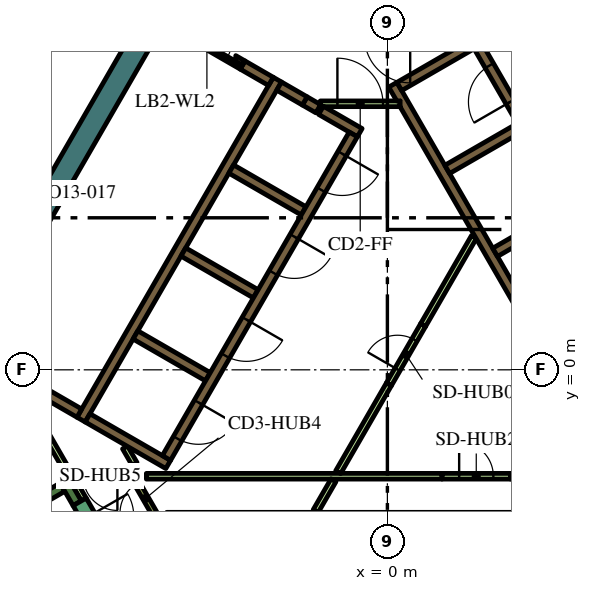
"""IFC4 building model, lengths in metres.
Left out: names, types, materials, properties, quantities, classifications, styles, units other than length and angle.
Written with IfcOpenShell. Run it as: python <this file> out.ifc"""

import sys

from ifc_helpers import new_model, si_unit, direction, frame, frame_2d, origin, place, context, subcontext, project, spatial, polyline, rectangle, outline, extrude, element, fill, save


model = new_model("IFC4")
c1 = context("Model", 3, precision=1e-05, world=origin(), true_north=direction((0.0, 1.0)))
c2 = subcontext(c1, "Body", "Model", "MODEL_VIEW")
j1 = project(units=[si_unit("LENGTHUNIT", "METRE"), si_unit("PLANEANGLEUNIT", "RADIAN")], contexts=[c1])
p1 = place(None, origin())
s1 = spatial("IfcSite", under=j1, at=p1, CompositionType="ELEMENT")
p2 = place(p1, origin())
s2 = spatial("IfcBuilding", under=s1, at=p2, CompositionType="ELEMENT")
p3 = place(p2, frame((0.0, 0.0, 292.2)))
s3 = spatial("IfcBuildingStorey", under=s2, at=p3, CompositionType="ELEMENT", Elevation=292.2)
p4 = place(p3, frame((1.989, 16.456, 0.0), z_axis=(0.0, 0.0, 1.0), x_axis=(0.49999102663, -0.8660305845, 0.0)))
e1 = element("IfcWall", 1, at=p4, inside=s3, PredefinedType="SOLIDWALL", context=c2, shape_type="SweptSolid", body=[
    extrude(rectangle(XDim=12.406, YDim=0.6, at=frame_2d((6.203, 0.0))), origin(), (0.0, 0.0, 1.0), 4.2),
])
p5 = place(p3, origin())
e2 = element("IfcWall", 2, at=p5, inside=s3, PredefinedType="SOLIDWALL", context=c2, shape_type="SweptSolid", body=[
    extrude(outline(polyline([(-15.502, -6.35), (-4.912, 11.992), (-4.393, 11.692), (-10.815, 0.569), (-10.84, 0.583), (-10.84, 0.583), (-10.84, 0.583), (-10.965, 0.367), (-10.965, 0.367), (-10.965, 0.367), (-10.94, 0.352), (-11.033, 0.191), (-14.809, -6.35), (-15.156, -6.95), (-15.502, -6.35)])), origin(), (0.0, 0.0, 1.0), 4.2),
])
p6 = place(p3, frame((-14.44, -6.49, 0.0), z_axis=(0.0, 0.0, 1.0), x_axis=(0.866022966069, 0.500004222222, 0.0)))
e3 = element("IfcWall", 3, at=p6, inside=s3, PredefinedType="SOLIDWALL", context=c2, shape_type="SweptSolid", body=[
    extrude(rectangle(XDim=6.8, YDim=0.25, at=frame_2d((3.4, 0.0))), origin(), (0.0, 0.0, 1.0), 4.2),
])
p7 = place(p3, frame((-8.163, -3.511, 0.0), z_axis=(0.0, 0.0, 1.0), x_axis=(-0.499994068514, 0.866028828302, 0.0)))
e4 = element("IfcWall", 4, at=p7, inside=s3, PredefinedType="SOLIDWALL", context=c2, shape_type="SweptSolid", body=[
    extrude(rectangle(XDim=0.674, YDim=0.25, at=frame_2d((0.337, 0.0))), origin(), (0.0, 0.0, 1.0), 4.2),
])
e5 = element("IfcWall", 5, at=p5, inside=s3, PredefinedType="SOLIDWALL", context=c2, shape_type="SweptSolid", body=[
    extrude(outline(polyline([(0.332, 6.925), (0.335, 6.925), (0.335, 6.925), (0.335, 6.925), (0.335, 7.075), (0.335, 7.075), (0.335, 7.075), (0.245, 7.075), (0.035, 7.439), (0.252, 7.564), (0.377, 7.348), (1.512, 5.382), (1.637, 5.165), (2.221, 4.153), (2.771, 3.199), (2.896, 2.983), (3.138, 2.564), (4.031, 1.017), (4.156, 0.801), (5.292, -1.165), (5.417, -1.382), (6.073, -2.519), (6.552, -3.348), (6.677, -3.564), (6.46, -3.689), (0.332, 6.925)])), origin(), (0.0, 0.0, 1.0), 4.2),
])
p8 = place(p3, frame((3.1, 9.064, 0.0), z_axis=(0.0, 0.0, 1.0), x_axis=(-0.866030133475, -0.499991807846, 0.0)))
e6 = element("IfcWall", 6, at=p8, inside=s3, PredefinedType="SOLIDWALL", context=c2, shape_type="SweptSolid", body=[
    extrude(rectangle(XDim=3.217, YDim=0.25, at=frame_2d((1.608, 0.0))), origin(), (0.0, 0.0, 1.0), 4.2),
])
p9 = place(p3, frame((1.574, 5.274, 0.0), z_axis=(0.0, 0.0, 1.0), x_axis=(0.866028486751, 0.499994660107, 0.0)))
e7 = element("IfcWall", 7, at=p9, inside=s3, PredefinedType="SOLIDWALL", context=c2, shape_type="SweptSolid", body=[
    extrude(rectangle(XDim=2.2, YDim=0.25, at=frame_2d((1.1, 0.0))), origin(), (0.0, 0.0, 1.0), 4.2),
])
p10 = place(p3, frame((2.834, 3.091, 0.0), z_axis=(0.0, 0.0, 1.0), x_axis=(0.866008176907, 0.50002983664, 0.0)))
e8 = element("IfcWall", 8, at=p10, inside=s3, PredefinedType="SOLIDWALL", context=c2, shape_type="SweptSolid", body=[
    extrude(rectangle(XDim=2.2, YDim=0.25, at=frame_2d((1.1, 0.0))), origin(), (0.0, 0.0, 1.0), 4.2),
])
p11 = place(p3, frame((-8.06, -1.311, 0.0), z_axis=(0.0, 0.0, 1.0), x_axis=(0.50000273126, 0.866023826885, 0.0)))
e9 = element("IfcWall", 9, at=p11, inside=s3, PredefinedType="SOLIDWALL", context=c2, shape_type="SweptSolid", body=[
    extrude(rectangle(XDim=10.33, YDim=0.25, at=frame_2d((5.165, 0.0))), origin(), (0.0, 0.0, 1.0), 4.2),
])
p12 = place(p3, frame((-1.819, 6.87, 0.0), z_axis=(0.0, 0.0, 1.0), x_axis=(-0.866294599386, 0.499533449405, 0.0)))
e10 = element("IfcWall", 10, at=p12, inside=s3, PredefinedType="SOLIDWALL", context=c2, shape_type="SweptSolid", body=[
    extrude(rectangle(XDim=0.41, YDim=0.25, at=frame_2d((0.205, 0.0))), origin(), (0.0, 0.0, 1.0), 4.2),
])
p13 = place(p3, frame((-2.849, 7.465, 0.0), z_axis=(0.0, 0.0, 1.0), x_axis=(0.865955664968, -0.500120771724, 0.0)))
e11 = element("IfcWall", 11, at=p13, inside=s3, PredefinedType="SOLIDWALL", context=c2, shape_type="SweptSolid", body=[
    extrude(rectangle(XDim=0.778, YDim=0.25, at=frame_2d((0.389, 0.0))), origin(), (0.0, 0.0, 1.0), 4.2),
])
p14 = place(p3, frame((-0.728, 6.24, 0.0), z_axis=(0.0, 0.0, 1.0), x_axis=(-0.866002680491, 0.500039355833, 0.0)))
e12 = element("IfcWall", 12, at=p14, inside=s3, PredefinedType="SOLIDWALL", context=c2, shape_type="SweptSolid", body=[
    extrude(rectangle(XDim=1.178, YDim=0.25, at=frame_2d((0.589, 0.0))), origin(), (0.0, 0.0, 1.0), 4.2),
])
for number, where, z_axis, x_axis in (
    (13, (-2.204, 4.182, 0.0), (0.0, 0.0, 1.0), (-0.866, 0.5, 0.0)),
    (14, (-5.369, 3.1, 0.0), (0.0, 0.0, 1.0), (0.866, -0.5, 0.0)),
    (15, (-4.724, -0.182, 0.0), (0.0, 0.0, 1.0), (-0.866, 0.5, 0.0)),
):
    element("IfcWall", number, at=place(p3, frame(where, z_axis=z_axis, x_axis=x_axis)), inside=s3, PredefinedType="SOLIDWALL", context=c2, shape_type="SweptSolid", body=[
        extrude(rectangle(XDim=2.2, YDim=0.25, at=frame_2d((1.1, 0.0))), origin(), (0.0, 0.0, 1.0), 4.2),
    ])
p15 = place(p3, frame((-7.889, -1.265, 0.0), z_axis=(0.0, 0.0, 1.0), x_axis=(0.866057815567, -0.499943856944, 0.0)))
e16 = element("IfcWall", 16, at=p15, inside=s3, PredefinedType="SOLIDWALL", context=c2, shape_type="SweptSolid", body=[
    extrude(rectangle(XDim=2.45, YDim=0.25, at=frame_2d((1.225, 0.0))), origin(), (0.0, 0.0, 1.0), 4.2),
])
p16 = place(p3, frame((-9.95, -0.075, 0.0), z_axis=(0.0, 0.0, 1.0), x_axis=(0.865962177421, -0.500109495288, 0.0)))
e17 = element("IfcWall", 17, at=p16, inside=s3, PredefinedType="SOLIDWALL", context=c2, shape_type="SweptSolid", body=[
    extrude(rectangle(XDim=2.129, YDim=0.25, at=frame_2d((1.065, 0.0))), origin(), (0.0, 0.0, 1.0), 4.2),
])
p17 = place(p3, frame((-3.809, 8.019, 0.0), z_axis=(0.0, 0.0, 1.0), x_axis=(0.866010229787, -0.500026281214, 0.0)))
e18 = element("IfcWall", 18, at=p17, inside=s3, PredefinedType="SOLIDWALL", context=c2, shape_type="SweptSolid", body=[
    extrude(rectangle(XDim=0.858, YDim=0.25, at=frame_2d((0.429, 0.0))), origin(), (0.0, 0.0, 1.0), 4.2),
])
e19 = element("IfcWall", 19, at=p5, inside=s3, PredefinedType="SOLIDWALL", context=c2, shape_type="SweptSolid", body=[
    extrude(outline(polyline([(-3.748, 8.128), (-3.813, 8.015), (-4.027, 8.139), (-4.017, 8.156), (-4.008, 8.173), (-4.0, 8.192), (-3.995, 8.21), (-3.991, 8.23), (-3.99, 8.25), (-3.99, 8.268), (-3.748, 8.128)])), origin(), (0.0, 0.0, 1.0), 4.2),
])
p18 = place(p3, frame((-9.718, -0.417, 0.0), z_axis=(0.0, 0.0, 1.0), x_axis=(0.499966538646, -0.866044721844, 0.0)))
e20 = element("IfcWall", 20, at=p18, inside=s3, PredefinedType="PARTITIONING", context=c2, shape_type="SweptSolid", body=[
    extrude(rectangle(XDim=2.511, YDim=0.15, at=frame_2d((1.255, 0.0))), origin(), (0.0, 0.0, 1.0), 3.55),
])
p19 = place(p3, frame((0.941, 1.179, 0.0), z_axis=(0.0, 0.0, 1.0), x_axis=(0.499962406319, 0.866047107418, 0.0)))
e21 = element("IfcWall", 21, at=p19, inside=s3, PredefinedType="PARTITIONING", context=c2, shape_type="SweptSolid", body=[
    extrude(rectangle(XDim=2.672, YDim=0.15, at=frame_2d((1.336, 0.0))), origin(), (0.0, 0.0, 1.0), 3.55),
])
p20 = place(p3, frame((1.438, -2.8, 0.0), z_axis=(0.0, 0.0, 1.0), x_axis=(-1.0, 0.0, 0.0)))
e22 = element("IfcWall", 22, at=p20, inside=s3, PredefinedType="PARTITIONING", context=c2, shape_type="SweptSolid", body=[
    extrude(rectangle(XDim=7.781, YDim=0.15, at=frame_2d((3.891, 0.0))), origin(), (0.0, 0.0, 1.0), 3.55),
])
p21 = place(p3, frame((-1.418, -2.907, 0.0), z_axis=(0.0, 0.0, 1.0), x_axis=(-0.499978056798, -0.866038072327, 0.0)))
e23 = element("IfcWall", 23, at=p21, inside=s3, PredefinedType="PARTITIONING", context=c2, shape_type="SweptSolid", body=[
    extrude(rectangle(XDim=0.937, YDim=0.15, at=frame_2d((0.469, 0.0))), origin(), (0.0, 0.0, 1.0), 3.55),
])
for number, where, z_axis, x_axis in (
    (24, (-1.295, -2.693, 0.0), (0.0, 0.0, 1.0), (0.5, 0.866, 0.0)),
    (25, (3.238, -2.8, 0.0), (0.0, 0.0, 1.0), (1.0, 0.0, 0.0)),
):
    element("IfcWall", number, at=place(p3, frame(where, z_axis=z_axis, x_axis=x_axis)), inside=s3, PredefinedType="PARTITIONING", context=c2, shape_type="SweptSolid", body=[
        extrude(rectangle(XDim=2.672, YDim=0.15, at=frame_2d((1.336, 0.0))), origin(), (0.0, 0.0, 1.0), 3.55),
    ])
p22 = place(p3, frame((-6.653, -2.477, 0.0), z_axis=(0.0, 0.0, 1.0), x_axis=(-0.500002592159, 0.866023907196, 0.0)))
e26 = element("IfcWall", 26, at=p22, inside=s3, PredefinedType="PARTITIONING", context=c2, shape_type="SweptSolid", body=[
    extrude(rectangle(XDim=0.503, YDim=0.15, at=frame_2d((0.251, 0.0))), origin(), (0.0, 0.0, 1.0), 3.55),
])
p23 = place(p3, frame((-7.99, -3.412, 0.0), z_axis=(0.0, 0.0, 1.0), x_axis=(-0.499858525911, 0.866107068482, 0.0)))
e27 = element("IfcWall", 27, at=p23, inside=s3, PredefinedType="PARTITIONING", context=c2, shape_type="SweptSolid", body=[
    extrude(rectangle(XDim=0.466, YDim=0.15, at=frame_2d((0.233, 0.0))), origin(), (0.0, 0.0, 1.0), 3.55),
])
p24 = place(p3, frame((8.565, -2.185, 0.0), z_axis=(0.0, 0.0, 1.0), x_axis=(-0.499997954832, 0.866026584559, 0.0)))
e28 = element("IfcWall", 28, at=p24, inside=s3, PredefinedType="SOLIDWALL", context=c2, shape_type="SweptSolid", body=[
    extrude(rectangle(XDim=12.35, YDim=0.25, at=frame_2d((6.175, 0.0))), origin(), (0.0, 0.0, 1.0), 4.2),
])
p25 = place(p24, frame((0.685, 0.0, 0.0)))
e29 = element("IfcOpeningElement", 29, at=p25, cuts=e28, PredefinedType="OPENING", context=c2, shape_type="SweptSolid", body=[
    extrude(rectangle(XDim=0.9, YDim=2.1, at=frame_2d((0.45, 1.05))), frame((0.0, 0.135, 0.0), z_axis=(0.0, -1.0, 0.0), x_axis=(1.0, 0.0, 0.0)), (0.0, 0.0, 1.0), 0.27),
])
p26 = place(p24, frame((3.105, 0.0, 0.0)))
e30 = element("IfcOpeningElement", 30, at=p26, cuts=e28, PredefinedType="OPENING", context=c2, shape_type="SweptSolid", body=[
    extrude(rectangle(XDim=1.1, YDim=2.1, at=frame_2d((0.55, 1.05))), frame((0.0, 0.135, 0.0), z_axis=(0.0, -1.0, 0.0), x_axis=(1.0, 0.0, 0.0)), (0.0, 0.0, 1.0), 0.27),
])
p27 = place(p24, frame((5.625, 0.0, 0.0)))
e31 = element("IfcOpeningElement", 31, at=p27, cuts=e28, PredefinedType="OPENING", context=c2, shape_type="SweptSolid", body=[
    extrude(rectangle(XDim=1.1, YDim=2.1, at=frame_2d((0.55, 1.05))), frame((0.0, 0.135, 0.0), z_axis=(0.0, -1.0, 0.0), x_axis=(1.0, 0.0, 0.0)), (0.0, 0.0, 1.0), 0.27),
])
p28 = place(p24, frame((8.145, 0.0, 0.0)))
e32 = element("IfcOpeningElement", 32, at=p28, cuts=e28, PredefinedType="OPENING", context=c2, shape_type="SweptSolid", body=[
    extrude(rectangle(XDim=1.1, YDim=2.1, at=frame_2d((0.55, 1.05))), frame((0.0, 0.135, 0.0), z_axis=(0.0, -1.0, 0.0), x_axis=(1.0, 0.0, 0.0)), (0.0, 0.0, 1.0), 0.27),
])
p29 = place(p24, frame((10.665, 0.0, 0.0)))
e33 = element("IfcOpeningElement", 33, at=p29, cuts=e28, PredefinedType="OPENING", context=c2, shape_type="SweptSolid", body=[
    extrude(rectangle(XDim=1.1, YDim=2.1, at=frame_2d((0.55, 1.05))), frame((0.0, 0.135, 0.0), z_axis=(0.0, -1.0, 0.0), x_axis=(1.0, 0.0, 0.0)), (0.0, 0.0, 1.0), 0.27),
])
p30 = place(p3, frame((-0.898, 6.194, 0.0), z_axis=(0.0, 0.0, 1.0), x_axis=(-0.499996202215, -0.866027596426, 0.0)))
e34 = element("IfcWall", 34, at=p30, inside=s3, PredefinedType="SOLIDWALL", context=c2, shape_type="SweptSolid", body=[
    extrude(rectangle(XDim=9.83, YDim=0.25, at=frame_2d((4.915, 0.0))), origin(), (0.0, 0.0, 1.0), 4.2),
])
p31 = place(p30, frame((0.585, 0.0, 0.0)))
e35 = element("IfcOpeningElement", 35, at=p31, cuts=e34, PredefinedType="OPENING", context=c2, shape_type="SweptSolid", body=[
    extrude(rectangle(XDim=1.1, YDim=2.1, at=frame_2d((0.55, 1.05))), frame((0.0, 0.135, 0.0), z_axis=(0.0, -1.0, 0.0), x_axis=(1.0, 0.0, 0.0)), (0.0, 0.0, 1.0), 0.27),
])
p32 = place(p30, frame((3.105, 0.0, 0.0)))
e36 = element("IfcOpeningElement", 36, at=p32, cuts=e34, PredefinedType="OPENING", context=c2, shape_type="SweptSolid", body=[
    extrude(rectangle(XDim=1.1, YDim=2.1, at=frame_2d((0.55, 1.05))), frame((0.0, 0.135, 0.0), z_axis=(0.0, -1.0, 0.0), x_axis=(1.0, 0.0, 0.0)), (0.0, 0.0, 1.0), 0.27),
])
p33 = place(p30, frame((5.625, 0.0, 0.0)))
e37 = element("IfcOpeningElement", 37, at=p33, cuts=e34, PredefinedType="OPENING", context=c2, shape_type="SweptSolid", body=[
    extrude(rectangle(XDim=1.1, YDim=2.1, at=frame_2d((0.55, 1.05))), frame((0.0, 0.135, 0.0), z_axis=(0.0, -1.0, 0.0), x_axis=(1.0, 0.0, 0.0)), (0.0, 0.0, 1.0), 0.27),
])
p34 = place(p30, frame((8.145, 0.0, 0.0)))
e38 = element("IfcOpeningElement", 38, at=p34, cuts=e34, PredefinedType="OPENING", context=c2, shape_type="SweptSolid", body=[
    extrude(rectangle(XDim=1.1, YDim=2.1, at=frame_2d((0.55, 1.05))), frame((0.0, 0.135, 0.0), z_axis=(0.0, -1.0, 0.0), x_axis=(1.0, 0.0, 0.0)), (0.0, 0.0, 1.0), 0.27),
])
p35 = place(p3, frame((-8.098, -3.474, 0.0), z_axis=(0.0, 0.0, 1.0), x_axis=(0.49994051562, -0.866059744384, 0.0)))
e39 = element("IfcWall", 39, at=p35, inside=s3, PredefinedType="SOLIDWALL", context=c2, shape_type="SweptSolid", body=[
    extrude(rectangle(XDim=2.1, YDim=0.4, at=frame_2d((1.05, 0.0))), origin(), (0.0, 0.0, 1.0), 4.2),
])
p36 = place(p35, frame((0.45, 0.0, 0.0)))
e40 = element("IfcOpeningElement", 40, at=p36, cuts=e39, PredefinedType="OPENING", context=c2, shape_type="SweptSolid", body=[
    extrude(rectangle(XDim=1.2, YDim=2.1, at=frame_2d((0.6, 1.05))), frame((0.0, 0.21, 0.0), z_axis=(0.0, -1.0, 0.0), x_axis=(1.0, 0.0, 0.0)), (0.0, 0.0, 1.0), 0.42),
])
p37 = place(p3, frame((-1.765, 7.0, 0.0), z_axis=(0.0, 0.0, 1.0), x_axis=(1.0, 0.0, 0.0)))
e41 = element("IfcWall", 41, at=p37, inside=s3, PredefinedType="PARTITIONING", context=c2, shape_type="SweptSolid", body=[
    extrude(rectangle(XDim=2.1, YDim=0.15, at=frame_2d((1.05, 0.0))), origin(), (0.0, 0.0, 1.0), 3.55),
])
p38 = place(p37, frame((0.45, 0.0, 0.0)))
e42 = element("IfcOpeningElement", 42, at=p38, cuts=e41, PredefinedType="OPENING", context=c2, shape_type="SweptSolid", body=[
    extrude(rectangle(XDim=1.2, YDim=2.1, at=frame_2d((0.6, 1.05))), frame((0.0, 0.085, 0.0), z_axis=(0.0, -1.0, 0.0), x_axis=(1.0, 0.0, 0.0)), (0.0, 0.0, 1.0), 0.17),
])
p39 = place(p3, frame((-5.861, -4.248, 0.0), z_axis=(0.0, 0.0, 1.0), x_axis=(-0.500043646338, 0.866000203093, 0.0)))
e43 = element("IfcWall", 43, at=p39, inside=s3, PredefinedType="PARTITIONING", context=c2, shape_type="SweptSolid", body=[
    extrude(rectangle(XDim=1.93, YDim=0.15, at=frame_2d((0.965, 0.0))), origin(), (0.0, 0.0, 1.0), 4.2),
])
p40 = place(p39, frame((0.55, 0.0, 0.0)))
e44 = element("IfcOpeningElement", 44, at=p40, cuts=e43, PredefinedType="OPENING", context=c2, shape_type="SweptSolid", body=[
    extrude(rectangle(XDim=0.9, YDim=2.1, at=frame_2d((0.45, 1.05))), frame((0.0, 0.085, 0.0), z_axis=(0.0, -1.0, 0.0), x_axis=(1.0, 0.0, 0.0)), (0.0, 0.0, 1.0), 0.17),
])
p41 = place(p3, frame((-5.659, 9.012, 0.0), z_axis=(0.0, 0.0, 1.0), x_axis=(0.866009402589, -0.500027713859, 0.0)))
e45 = element("IfcWall", 45, at=p41, inside=s3, PredefinedType="PARTITIONING", context=c2, shape_type="SweptSolid", body=[
    extrude(rectangle(XDim=2.1, YDim=0.12, at=frame_2d((1.05, 0.0))), origin(), (0.0, 0.0, 1.0), 3.55),
])
p42 = place(p41, frame((0.45, 0.0, 0.0)))
e46 = element("IfcOpeningElement", 46, at=p42, cuts=e45, PredefinedType="OPENING", context=c2, shape_type="SweptSolid", body=[
    extrude(rectangle(XDim=1.2, YDim=2.1, at=frame_2d((0.6, 1.05))), frame((0.0, 0.07, 0.0), z_axis=(0.0, -1.0, 0.0), x_axis=(1.0, 0.0, 0.0)), (0.0, 0.0, 1.0), 0.14),
])
p43 = place(p3, frame((0.041, -0.379, 0.0), z_axis=(0.0, 0.0, 1.0), x_axis=(0.499961193289, 0.866047807691, 0.0)))
e47 = element("IfcWall", 47, at=p43, inside=s3, PredefinedType="PARTITIONING", context=c2, shape_type="SweptSolid", body=[
    extrude(rectangle(XDim=1.8, YDim=0.15, at=frame_2d((0.9, 0.0))), origin(), (0.0, 0.0, 1.0), 3.55),
])
p44 = place(p43, frame((0.45, 0.0, 0.0)))
e48 = element("IfcOpeningElement", 48, at=p44, cuts=e47, PredefinedType="OPENING", context=c2, shape_type="SweptSolid", body=[
    extrude(rectangle(XDim=0.9, YDim=2.1, at=frame_2d((0.45, 1.05))), frame((0.0, 0.085, 0.0), z_axis=(0.0, -1.0, 0.0), x_axis=(1.0, 0.0, 0.0)), (0.0, 0.0, 1.0), 0.17),
])
p45 = place(p3, frame((1.438, -2.8, 0.0), z_axis=(0.0, 0.0, 1.0), x_axis=(1.0, 0.0, 0.0)))
e49 = element("IfcWall", 49, at=p45, inside=s3, PredefinedType="PARTITIONING", context=c2, shape_type="SweptSolid", body=[
    extrude(rectangle(XDim=1.8, YDim=0.15, at=frame_2d((0.9, 0.0))), origin(), (0.0, 0.0, 1.0), 3.55),
])
p46 = place(p45, frame((0.45, 0.0, 0.0)))
e50 = element("IfcOpeningElement", 50, at=p46, cuts=e49, PredefinedType="OPENING", context=c2, shape_type="SweptSolid", body=[
    extrude(rectangle(XDim=0.9, YDim=2.1, at=frame_2d((0.45, 1.05))), frame((0.0, 0.085, 0.0), z_axis=(0.0, -1.0, 0.0), x_axis=(1.0, 0.0, 0.0)), (0.0, 0.0, 1.0), 0.17),
])
p47 = place(p3, frame((-6.655, -2.8, 0.0), z_axis=(0.0, 0.0, 1.0), x_axis=(-1.0, 0.0, 0.0)))
e51 = element("IfcWall", 51, at=p47, inside=s3, PredefinedType="PARTITIONING", context=c2, shape_type="SweptSolid", body=[
    extrude(rectangle(XDim=1.8, YDim=0.15, at=frame_2d((0.9, 0.0))), origin(), (0.0, 0.0, 1.0), 3.55),
])
p48 = place(p47, frame((0.45, 0.0, 0.0)))
e52 = element("IfcOpeningElement", 52, at=p48, cuts=e51, PredefinedType="OPENING", context=c2, shape_type="SweptSolid", body=[
    extrude(rectangle(XDim=0.9, YDim=2.1, at=frame_2d((0.45, 1.05))), frame((0.0, 0.085, 0.0), z_axis=(0.0, -1.0, 0.0), x_axis=(1.0, 0.0, 0.0)), (0.0, 0.0, 1.0), 0.17),
])
p49 = place(p3, frame((-7.436, 11.221, 0.0), z_axis=(0.0, 0.0, 1.0), x_axis=(-0.49999894854, -0.866026010844, 0.0)))
e53 = element("IfcWall", 53, at=p49, inside=s3, PredefinedType="PARTITIONING", context=c2, shape_type="SweptSolid", body=[
    extrude(rectangle(XDim=12.0, YDim=0.2, at=frame_2d((6.0, 0.0))), origin(), (0.0, 0.0, 1.0), 3.55),
])
p50 = place(p49, frame((5.5, 0.0, 0.0)))
e54 = element("IfcOpeningElement", 54, at=p50, cuts=e53, PredefinedType="OPENING", context=c2, shape_type="SweptSolid", body=[
    extrude(rectangle(XDim=1.0, YDim=2.1, at=frame_2d((0.5, 1.05))), frame((0.0, 0.11, 0.0), z_axis=(0.0, -1.0, 0.0), x_axis=(1.0, 0.0, 0.0)), (0.0, 0.0, 1.0), 0.22),
])
p51 = place(p29, origin())
e55 = element("IfcDoor", 55, at=p51, inside=s3, OperationType="DOUBLE_DOOR_SLIDING", PredefinedType="DOOR", context=c2, shape_type="SweptSolid", body=[
    extrude(rectangle(XDim=1.1, YDim=2.1, at=frame_2d((0.55, 1.05))), frame((0.0, 0.025, 0.0), z_axis=(0.0, -1.0, 0.0), x_axis=(1.0, 0.0, 0.0)), (0.0, 0.0, 1.0), 0.05),
])
fill(e33, e55)
p52 = place(p31, origin())
e56 = element("IfcDoor", 56, at=p52, inside=s3, OperationType="DOUBLE_DOOR_SLIDING", PredefinedType="DOOR", context=c2, shape_type="SweptSolid", body=[
    extrude(rectangle(XDim=1.1, YDim=2.1, at=frame_2d((0.55, 1.05))), frame((0.0, 0.025, 0.0), z_axis=(0.0, -1.0, 0.0), x_axis=(1.0, 0.0, 0.0)), (0.0, 0.0, 1.0), 0.05),
])
fill(e35, e56)
p53 = place(p32, origin())
e57 = element("IfcDoor", 57, at=p53, inside=s3, OperationType="DOUBLE_DOOR_SLIDING", PredefinedType="DOOR", context=c2, shape_type="SweptSolid", body=[
    extrude(rectangle(XDim=1.1, YDim=2.1, at=frame_2d((0.55, 1.05))), frame((0.0, 0.025, 0.0), z_axis=(0.0, -1.0, 0.0), x_axis=(1.0, 0.0, 0.0)), (0.0, 0.0, 1.0), 0.05),
])
fill(e36, e57)
p54 = place(p33, origin())
e58 = element("IfcDoor", 58, at=p54, inside=s3, OperationType="DOUBLE_DOOR_SLIDING", PredefinedType="DOOR", context=c2, shape_type="SweptSolid", body=[
    extrude(rectangle(XDim=1.1, YDim=2.1, at=frame_2d((0.55, 1.05))), frame((0.0, 0.025, 0.0), z_axis=(0.0, -1.0, 0.0), x_axis=(1.0, 0.0, 0.0)), (0.0, 0.0, 1.0), 0.05),
])
fill(e37, e58)
p55 = place(p34, origin())
e59 = element("IfcDoor", 59, at=p55, inside=s3, OperationType="DOUBLE_DOOR_SLIDING", PredefinedType="DOOR", context=c2, shape_type="SweptSolid", body=[
    extrude(rectangle(XDim=1.1, YDim=2.1, at=frame_2d((0.55, 1.05))), frame((0.0, 0.025, 0.0), z_axis=(0.0, -1.0, 0.0), x_axis=(1.0, 0.0, 0.0)), (0.0, 0.0, 1.0), 0.05),
])
fill(e38, e59)
p56 = place(p38, origin())
e60 = element("IfcDoor", 60, at=p56, inside=s3, OperationType="SINGLE_SWING_LEFT", PredefinedType="DOOR", context=c2, shape_type="SweptSolid", body=[
    extrude(rectangle(XDim=1.2, YDim=2.1, at=frame_2d((0.6, 1.05))), frame((0.0, 0.025, 0.0), z_axis=(0.0, -1.0, 0.0), x_axis=(1.0, 0.0, 0.0)), (0.0, 0.0, 1.0), 0.05),
])
fill(e42, e60)
p57 = place(p40, origin())
e61 = element("IfcDoor", 61, at=p57, inside=s3, OperationType="SINGLE_SWING_LEFT", PredefinedType="DOOR", context=c2, shape_type="SweptSolid", body=[
    extrude(rectangle(XDim=0.9, YDim=2.1, at=frame_2d((0.45, 1.05))), frame((0.0, 0.025, 0.0), z_axis=(0.0, -1.0, 0.0), x_axis=(1.0, 0.0, 0.0)), (0.0, 0.0, 1.0), 0.05),
])
fill(e44, e61)
p58 = place(p42, origin())
e62 = element("IfcDoor", 62, at=p58, inside=s3, OperationType="SINGLE_SWING_LEFT", PredefinedType="DOOR", context=c2, shape_type="SweptSolid", body=[
    extrude(rectangle(XDim=1.2, YDim=2.1, at=frame_2d((0.6, 1.05))), frame((0.0, 0.025, 0.0), z_axis=(0.0, -1.0, 0.0), x_axis=(1.0, 0.0, 0.0)), (0.0, 0.0, 1.0), 0.05),
])
fill(e46, e62)
p59 = place(p44, origin())
e63 = element("IfcDoor", 63, at=p59, inside=s3, OperationType="SINGLE_SWING_LEFT", PredefinedType="DOOR", context=c2, shape_type="SweptSolid", body=[
    extrude(rectangle(XDim=0.9, YDim=2.1, at=frame_2d((0.45, 1.05))), frame((0.0, 0.025, 0.0), z_axis=(0.0, -1.0, 0.0), x_axis=(1.0, 0.0, 0.0)), (0.0, 0.0, 1.0), 0.05),
])
fill(e48, e63)
p60 = place(p46, origin())
e64 = element("IfcDoor", 64, at=p60, inside=s3, OperationType="SINGLE_SWING_LEFT", PredefinedType="DOOR", context=c2, shape_type="SweptSolid", body=[
    extrude(rectangle(XDim=0.9, YDim=2.1, at=frame_2d((0.45, 1.05))), frame((0.0, 0.025, 0.0), z_axis=(0.0, -1.0, 0.0), x_axis=(1.0, 0.0, 0.0)), (0.0, 0.0, 1.0), 0.05),
])
fill(e50, e64)
p61 = place(p48, origin())
e65 = element("IfcDoor", 65, at=p61, inside=s3, OperationType="SINGLE_SWING_LEFT", PredefinedType="DOOR", context=c2, shape_type="SweptSolid", body=[
    extrude(rectangle(XDim=0.9, YDim=2.1, at=frame_2d((0.45, 1.05))), frame((0.0, 0.025, 0.0), z_axis=(0.0, -1.0, 0.0), x_axis=(1.0, 0.0, 0.0)), (0.0, 0.0, 1.0), 0.05),
])
fill(e52, e65)
save(model, sys.argv[1])
